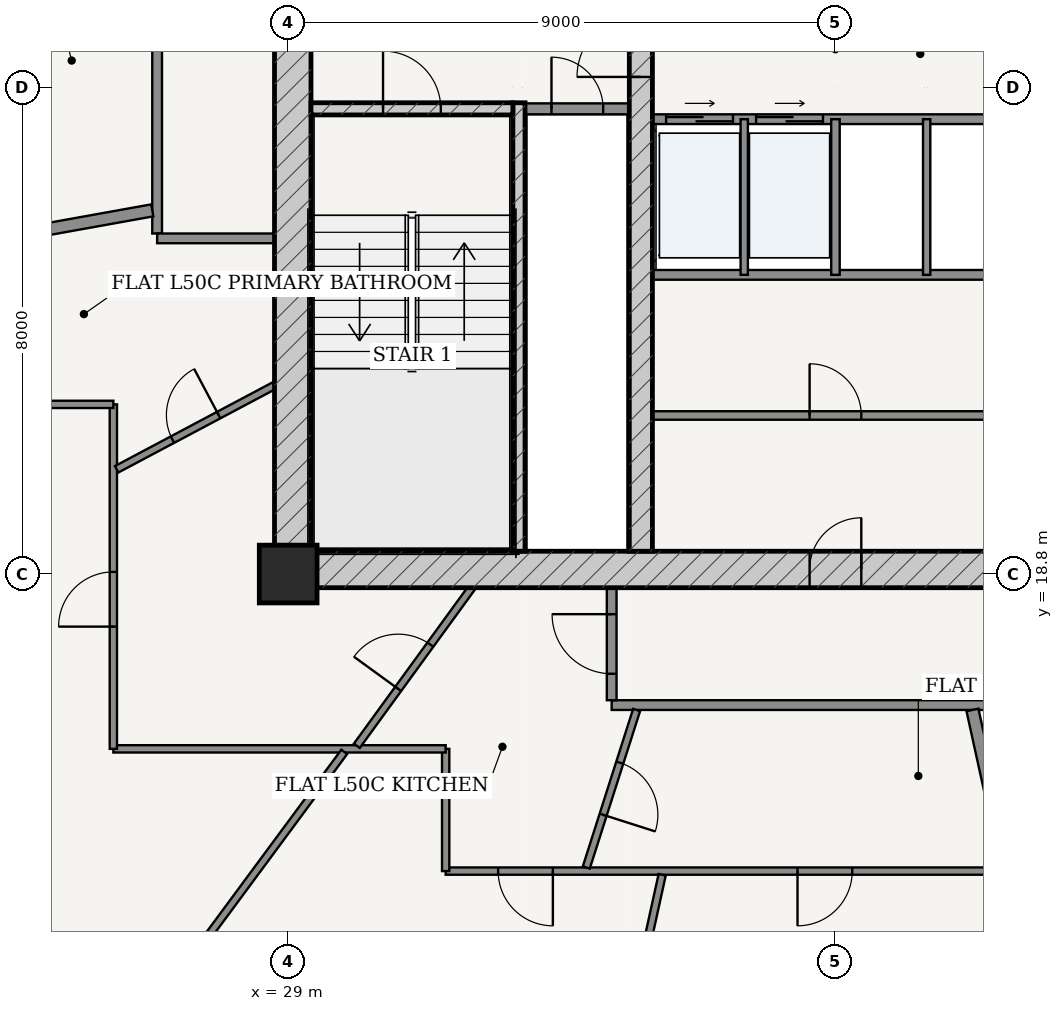
"""IFC4 building model, lengths in metres.
Left out: names, types, materials, properties, quantities, classifications, styles, units other than length and angle.
Written with IfcOpenShell. Run it as: python <this file> out.ifc"""

import sys

from ifc_helpers import new_model, si_unit, direction, frame, frame_2d, origin, origin_2d, place, context, subcontext, project, spatial, rectangle, extrude, source, transform, mapped, element, fill, save


model = new_model("IFC4")
c1 = context("Model", 3, precision=1e-05, world=origin(), true_north=direction((-0.2419218956, 0.970295726276)))
c2 = subcontext(c1, "Body", "Model", "MODEL_VIEW")
j1 = project(units=[si_unit("LENGTHUNIT", "METRE"), si_unit("PLANEANGLEUNIT", "RADIAN")], contexts=[c1])
p1 = place(None, origin())
s1 = spatial("IfcSite", under=j1, at=p1, CompositionType="ELEMENT")
p2 = place(p1, origin())
s2 = spatial("IfcBuilding", under=s1, at=p2, CompositionType="ELEMENT")
p3 = place(p2, frame((0.0, 0.0, 191.2)))
s3 = spatial("IfcBuildingStorey", under=s2, at=p3, CompositionType="ELEMENT", Elevation=191.2)
p4 = place(p3, frame((29.0, 18.8, 0.0), z_axis=(0.0, 0.0, 1.0), x_axis=(1.0, 0.0, 0.0)))
e1 = element("IfcColumn", 1, at=p4, inside=s3, PredefinedType="COLUMN", context=c2, shape_type="SweptSolid", body=[
    extrude(rectangle(XDim=0.95, YDim=0.95, at=origin_2d()), origin(), (0.0, 0.0, 1.0), 3.7),
])
p5 = place(p3, frame((28.775, 18.875, 0.0), z_axis=(0.0, 0.0, 1.0), x_axis=(1.0, 0.0, 0.0)))
e2 = element("IfcWall", 2, at=p5, inside=s3, PredefinedType="SHEAR", context=c2, shape_type="SweptSolid", body=[
    extrude(rectangle(XDim=18.45, YDim=0.6, at=frame_2d((9.225, 0.0))), origin(), (0.0, 0.0, 1.0), 3.435),
])
p6 = place(p5, frame((8.8, 0.0, 0.0)))
e3 = element("IfcOpeningElement", 3, at=p6, cuts=e2, PredefinedType="OPENING", context=c2, shape_type="SweptSolid", body=[
    extrude(rectangle(XDim=0.85, YDim=2.1, at=frame_2d((0.425, 1.05))), frame((0.0, 0.31, 0.0), z_axis=(0.0, -1.0, 0.0), x_axis=(1.0, 0.0, 0.0)), (0.0, 0.0, 1.0), 0.62),
])
p7 = place(p3, frame((29.075, 19.175, 0.0), z_axis=(0.0, 0.0, 1.0), x_axis=(0.0, 1.0, 0.0)))
e4 = element("IfcWall", 4, at=p7, inside=s3, PredefinedType="SHEAR", context=c2, shape_type="SweptSolid", body=[
    extrude(rectangle(XDim=15.25, YDim=0.6, at=frame_2d((7.625, 0.0))), origin(), (0.0, 0.0, 1.0), 3.435),
])
p8 = place(p7, frame((9.875, 0.0, 0.0)))
e5 = element("IfcOpeningElement", 5, at=p8, cuts=e4, PredefinedType="OPENING", context=c2, shape_type="SweptSolid", body=[
    extrude(rectangle(XDim=1.5, YDim=2.2, at=frame_2d((0.75, 1.1))), frame((0.0, 0.31, 0.0), z_axis=(0.0, -1.0, 0.0), x_axis=(1.0, 0.0, 0.0)), (0.0, 0.0, 1.0), 0.62),
])
p9 = place(p3, frame((32.795, 19.175, 0.0), z_axis=(0.0, 0.0, 1.0), x_axis=(0.0, 1.0, 0.0)))
e6 = element("IfcWall", 6, at=p9, inside=s3, PredefinedType="SOLIDWALL", context=c2, shape_type="SweptSolid", body=[
    extrude(rectangle(XDim=7.375, YDim=0.2, at=frame_2d((3.688, 0.0))), origin(), (0.0, 0.0, 1.0), 3.435),
])
p10 = place(p3, frame((29.375, 26.45, 0.0), z_axis=(0.0, 0.0, 1.0), x_axis=(1.0, 0.0, 0.0)))
e7 = element("IfcWall", 7, at=p10, inside=s3, PredefinedType="SOLIDWALL", context=c2, shape_type="SweptSolid", body=[
    extrude(rectangle(XDim=3.32, YDim=0.2, at=frame_2d((1.66, 0.0))), origin(), (0.0, 0.0, 1.0), 3.435),
])
p11 = place(p10, frame((1.185, 0.0, 0.0)))
e8 = element("IfcOpeningElement", 8, at=p11, cuts=e7, PredefinedType="OPENING", context=c2, shape_type="SweptSolid", body=[
    extrude(rectangle(XDim=0.95, YDim=2.15, at=frame_2d((0.475, 1.075))), frame((0.0, 0.11, 0.0), z_axis=(0.0, -1.0, 0.0), x_axis=(1.0, 0.0, 0.0)), (0.0, 0.0, 1.0), 0.22),
])
p12 = place(p3, frame((34.8, 19.175, 0.0), z_axis=(0.0, 0.0, 1.0), x_axis=(0.0, 1.0, 0.0)))
e9 = element("IfcWall", 9, at=p12, inside=s3, PredefinedType="SHEAR", context=c2, shape_type="SweptSolid", body=[
    extrude(rectangle(XDim=15.25, YDim=0.38, at=frame_2d((7.625, 0.0))), origin(), (0.0, 0.0, 1.0), 3.435),
])
p13 = place(p12, frame((7.8, 0.0, 0.0)))
e10 = element("IfcOpeningElement", 10, at=p13, cuts=e9, PredefinedType="OPENING", context=c2, shape_type="SweptSolid", body=[
    extrude(rectangle(XDim=1.05, YDim=2.15, at=frame_2d((0.525, 1.075))), frame((0.0, 0.2, 0.0), z_axis=(0.0, -1.0, 0.0), x_axis=(1.0, 0.0, 0.0)), (0.0, 0.0, 1.0), 0.4),
])
p14 = place(p3, frame((32.9, 26.45, 0.0), z_axis=(0.0, 0.0, 1.0), x_axis=(1.0, 0.0, 0.0)))
e11 = element("IfcWall", 11, at=p14, inside=s3, PredefinedType="PARTITIONING", context=c2, shape_type="SweptSolid", body=[
    extrude(rectangle(XDim=1.71, YDim=0.18, at=frame_2d((0.855, 0.0))), origin(), (0.0, 0.0, 1.0), 3.435),
])
p15 = place(p14, frame((0.43, 0.0, 0.0)))
e12 = element("IfcOpeningElement", 12, at=p15, cuts=e11, PredefinedType="OPENING", context=c2, shape_type="SweptSolid", body=[
    extrude(rectangle(XDim=0.85, YDim=2.1, at=frame_2d((0.425, 1.05))), frame((0.0, 0.1, 0.0), z_axis=(0.0, -1.0, 0.0), x_axis=(1.0, 0.0, 0.0)), (0.0, 0.0, 1.0), 0.2),
])
p16 = place(p3, frame((34.99, 26.28, 0.0), z_axis=(0.0, 0.0, 1.0), x_axis=(1.0, 0.0, 0.0)))
e13 = element("IfcWall", 13, at=p16, inside=s3, PredefinedType="PARTITIONING", context=c2, shape_type="SweptSolid", body=[
    extrude(rectangle(XDim=6.02, YDim=0.16, at=frame_2d((3.01, 0.0))), origin(), (0.0, 0.0, 1.0), 3.435),
])
p17 = place(p16, frame((0.225, 0.0, 0.0)))
e14 = element("IfcOpeningElement", 14, at=p17, cuts=e13, PredefinedType="OPENING", context=c2, shape_type="SweptSolid", body=[
    extrude(rectangle(XDim=1.1, YDim=2.2, at=frame_2d((0.55, 1.1))), frame((0.0, 0.09, 0.0), z_axis=(0.0, -1.0, 0.0), x_axis=(1.0, 0.0, 0.0)), (0.0, 0.0, 1.0), 0.18),
])
p18 = place(p16, frame((1.705, 0.0, 0.0)))
e15 = element("IfcOpeningElement", 15, at=p18, cuts=e13, PredefinedType="OPENING", context=c2, shape_type="SweptSolid", body=[
    extrude(rectangle(XDim=1.1, YDim=2.2, at=frame_2d((0.55, 1.1))), frame((0.0, 0.09, 0.0), z_axis=(0.0, -1.0, 0.0), x_axis=(1.0, 0.0, 0.0)), (0.0, 0.0, 1.0), 0.18),
])
p19 = place(p3, frame((34.99, 23.72, 0.0), z_axis=(0.0, 0.0, 1.0), x_axis=(1.0, 0.0, 0.0)))
e16 = element("IfcWall", 16, at=p19, inside=s3, PredefinedType="PARTITIONING", context=c2, shape_type="SweptSolid", body=[
    extrude(rectangle(XDim=6.02, YDim=0.16, at=frame_2d((3.01, 0.0))), origin(), (0.0, 0.0, 1.0), 3.435),
])
p20 = place(p3, frame((36.5, 23.72, 0.0), z_axis=(0.0, 0.0, 1.0), x_axis=(0.0, 1.0, 0.0)))
e17 = element("IfcWall", 17, at=p20, inside=s3, PredefinedType="PARTITIONING", context=c2, shape_type="SweptSolid", body=[
    extrude(rectangle(XDim=2.56, YDim=0.12, at=frame_2d((1.28, 0.0))), origin(), (0.0, 0.0, 1.0), 3.435),
])
p21 = place(p3, frame((38.0, 23.72, 0.0), z_axis=(0.0, 0.0, 1.0), x_axis=(0.0, 1.0, 0.0)))
e18 = element("IfcWall", 18, at=p21, inside=s3, PredefinedType="PARTITIONING", context=c2, shape_type="SweptSolid", body=[
    extrude(rectangle(XDim=2.56, YDim=0.14, at=frame_2d((1.28, 0.0))), origin(), (0.0, 0.0, 1.0), 3.435),
])
p22 = place(p3, frame((39.5, 23.72, 0.0), z_axis=(0.0, 0.0, 1.0), x_axis=(0.0, 1.0, 0.0)))
e19 = element("IfcWall", 19, at=p22, inside=s3, PredefinedType="PARTITIONING", context=c2, shape_type="SweptSolid", body=[
    extrude(rectangle(XDim=2.56, YDim=0.12, at=frame_2d((1.28, 0.0))), origin(), (0.0, 0.0, 1.0), 3.435),
])
p23 = place(p3, frame((34.99, 21.407, 0.0), z_axis=(0.0, 0.0, 1.0), x_axis=(1.0, 0.0, 0.0)))
e20 = element("IfcWall", 20, at=p23, inside=s3, PredefinedType="PARTITIONING", context=c2, shape_type="SweptSolid", body=[
    extrude(rectangle(XDim=6.02, YDim=0.14, at=frame_2d((3.01, 0.0))), origin(), (0.0, 0.0, 1.0), 3.435),
])
p24 = place(p23, frame((2.585, 0.0, 0.0)))
e21 = element("IfcOpeningElement", 21, at=p24, cuts=e20, PredefinedType="OPENING", context=c2, shape_type="SweptSolid", body=[
    extrude(rectangle(XDim=0.85, YDim=2.1, at=frame_2d((0.425, 1.05))), frame((0.0, 0.08, 0.0), z_axis=(0.0, -1.0, 0.0), x_axis=(1.0, 0.0, 0.0)), (0.0, 0.0, 1.0), 0.16),
])
p25 = place(p3, frame((26.845, 24.4, 0.0), z_axis=(0.0, 0.0, 1.0), x_axis=(0.0, 1.0, 0.0)))
e22 = element("IfcWall", 22, at=p25, inside=s3, PredefinedType="PARTITIONING", context=c2, shape_type="SweptSolid", body=[
    extrude(rectangle(XDim=10.625, YDim=0.16, at=frame_2d((5.312, 0.0))), origin(), (0.0, 0.0, 1.0), 2.951),
])
p26 = place(p3, frame((26.845, 24.32, 0.0), z_axis=(0.0, 0.0, 1.0), x_axis=(1.0, 0.0, 0.0)))
e23 = element("IfcWall", 23, at=p26, inside=s3, PredefinedType="PARTITIONING", context=c2, shape_type="SweptSolid", body=[
    extrude(rectangle(XDim=1.93, YDim=0.16, at=frame_2d((0.965, 0.0))), origin(), (0.0, 0.0, 1.0), 3.435),
])
p27 = place(p3, frame((34.32, 16.645, 0.0), z_axis=(0.0, 0.0, 1.0), x_axis=(1.0, 0.0, 0.0)))
e24 = element("IfcWall", 24, at=p27, inside=s3, PredefinedType="PARTITIONING", context=c2, shape_type="SweptSolid", body=[
    extrude(rectangle(XDim=14.835, YDim=0.16, at=frame_2d((7.417, 0.0))), origin(), (0.0, 0.0, 1.0), 2.951),
])
p28 = place(p27, frame((11.961, 0.0, 0.0)))
e25 = element("IfcOpeningElement", 25, at=p28, cuts=e24, PredefinedType="OPENING", context=c2, shape_type="SweptSolid", body=[
    extrude(rectangle(XDim=0.98, YDim=2.2, at=frame_2d((0.49, 1.1))), frame((0.0, 0.09, 0.0), z_axis=(0.0, -1.0, 0.0), x_axis=(1.0, 0.0, 0.0)), (0.0, 0.0, 1.0), 0.18),
])
p29 = place(p3, frame((34.32, 16.725, 0.0), z_axis=(0.0, 0.0, 1.0), x_axis=(0.0, 1.0, 0.0)))
e26 = element("IfcWall", 26, at=p29, inside=s3, PredefinedType="PARTITIONING", context=c2, shape_type="SweptSolid", body=[
    extrude(rectangle(XDim=1.85, YDim=0.16, at=frame_2d((0.925, 0.0))), origin(), (0.0, 0.0, 1.0), 3.435),
])
p30 = place(p29, frame((0.435, 0.0, 0.0)))
e27 = element("IfcOpeningElement", 27, at=p30, cuts=e26, PredefinedType="OPENING", context=c2, shape_type="SweptSolid", body=[
    extrude(rectangle(XDim=0.98, YDim=2.2, at=frame_2d((0.49, 1.1))), frame((0.0, 0.09, 0.0), z_axis=(0.0, -1.0, 0.0), x_axis=(1.0, 0.0, 0.0)), (0.0, 0.0, 1.0), 0.18),
])
p31 = place(p3, frame((26.765, 24.781, 0.0), z_axis=(0.0, 0.0, 1.0), x_axis=(-0.984226684914, -0.176911934879, 0.0)))
e28 = element("IfcWall", 28, at=p31, inside=s3, PredefinedType="PARTITIONING", context=c2, shape_type="SweptSolid", body=[
    extrude(rectangle(XDim=10.202, YDim=0.2, at=frame_2d((5.101, 0.0))), origin(), (0.0, 0.0, 1.0), 2.951),
])
p32 = place(p3, frame((40.734, 13.915, 0.0), z_axis=(0.0, 0.0, 1.0), x_axis=(-1.0, 0.0, 0.0)))
e29 = element("IfcWall", 29, at=p32, inside=s3, PredefinedType="PARTITIONING", context=c2, shape_type="SweptSolid", body=[
    extrude(rectangle(XDim=9.144, YDim=0.12, at=frame_2d((4.572, 0.0))), origin(), (0.0, 0.0, 1.0), 2.951),
])
p33 = place(p32, frame((7.381, 0.0, 0.0)))
e30 = element("IfcOpeningElement", 30, at=p33, cuts=e29, PredefinedType="OPENING", context=c2, shape_type="SweptSolid", body=[
    extrude(rectangle(XDim=0.9, YDim=2.15, at=frame_2d((0.45, 1.075))), frame((0.0, 0.07, 0.0), z_axis=(0.0, -1.0, 0.0), x_axis=(1.0, 0.0, 0.0)), (0.0, 0.0, 1.0), 0.14),
])
p34 = place(p32, frame((2.458, 0.0, 0.0)))
e31 = element("IfcOpeningElement", 31, at=p34, cuts=e29, PredefinedType="OPENING", context=c2, shape_type="SweptSolid", body=[
    extrude(rectangle(XDim=0.9, YDim=2.15, at=frame_2d((0.45, 1.075))), frame((0.0, 0.07, 0.0), z_axis=(0.0, -1.0, 0.0), x_axis=(1.0, 0.0, 0.0)), (0.0, 0.0, 1.0), 0.14),
])
p35 = place(p3, frame((31.59, 13.915, 0.0), z_axis=(0.0, 0.0, 1.0), x_axis=(0.0, 1.0, 0.0)))
e32 = element("IfcWall", 32, at=p35, inside=s3, PredefinedType="PARTITIONING", context=c2, shape_type="SweptSolid", body=[
    extrude(rectangle(XDim=2.01, YDim=0.12, at=frame_2d((1.005, 0.0))), origin(), (0.0, 0.0, 1.0), 3.11),
])
p36 = place(p3, frame((31.59, 15.925, 0.0), z_axis=(0.0, 0.0, 1.0), x_axis=(-1.0, 0.0, 0.0)))
e33 = element("IfcWall", 33, at=p36, inside=s3, PredefinedType="PARTITIONING", context=c2, shape_type="SweptSolid", body=[
    extrude(rectangle(XDim=5.465, YDim=0.12, at=frame_2d((2.732, 0.0))), origin(), (0.0, 0.0, 1.0), 2.951),
])
p37 = place(p3, frame((26.125, 15.925, 0.0), z_axis=(0.0, 0.0, 1.0), x_axis=(0.0, 1.0, 0.0)))
e34 = element("IfcWall", 34, at=p37, inside=s3, PredefinedType="PARTITIONING", context=c2, shape_type="SweptSolid", body=[
    extrude(rectangle(XDim=5.665, YDim=0.12, at=frame_2d((2.833, 0.0))), origin(), (0.0, 0.0, 1.0), 2.951),
])
p38 = place(p37, frame((2.01, 0.0, 0.0)))
e35 = element("IfcOpeningElement", 35, at=p38, cuts=e34, PredefinedType="OPENING", context=c2, shape_type="SweptSolid", body=[
    extrude(rectangle(XDim=0.9, YDim=2.15, at=frame_2d((0.45, 1.075))), frame((0.0, 0.07, 0.0), z_axis=(0.0, -1.0, 0.0), x_axis=(1.0, 0.0, 0.0)), (0.0, 0.0, 1.0), 0.14),
])
p39 = place(p3, frame((26.125, 21.59, 0.0), z_axis=(0.0, 0.0, 1.0), x_axis=(-1.0, 0.0, 0.0)))
e36 = element("IfcWall", 36, at=p39, inside=s3, PredefinedType="PARTITIONING", context=c2, shape_type="SweptSolid", body=[
    extrude(rectangle(XDim=2.01, YDim=0.12, at=frame_2d((1.005, 0.0))), origin(), (0.0, 0.0, 1.0), 3.11),
])
p40 = place(p3, frame((29.922, 15.875, 0.0), z_axis=(0.0, 0.0, 1.0), x_axis=(-0.594524636617, -0.804077394568, 0.0)))
e37 = element("IfcWall", 37, at=p40, inside=s3, PredefinedType="PARTITIONING", context=c2, shape_type="SweptSolid", body=[
    extrude(rectangle(XDim=6.68, YDim=0.12, at=frame_2d((3.34, 0.0))), origin(), (0.0, 0.0, 1.0), 2.951),
])
p41 = place(p3, frame((35.15, 13.854, 0.0), z_axis=(0.0, 0.0, 1.0), x_axis=(-0.214942949264, -0.976626606519, 0.0)))
e38 = element("IfcWall", 38, at=p41, inside=s3, PredefinedType="PARTITIONING", context=c2, shape_type="SweptSolid", body=[
    extrude(rectangle(XDim=6.427, YDim=0.12, at=frame_2d((3.213, 0.0))), origin(), (0.0, 0.0, 1.0), 2.951),
])
p42 = place(p3, frame((28.775, 21.901, 0.0), z_axis=(0.0, 0.0, 1.0), x_axis=(-0.883156592468, -0.46907828044, 0.0)))
e39 = element("IfcWall", 39, at=p42, inside=s3, PredefinedType="PARTITIONING", context=c2, shape_type="SweptSolid", body=[
    extrude(rectangle(XDim=2.938, YDim=0.12, at=frame_2d((1.469, 0.0))), origin(), (0.0, 0.0, 1.0), 3.435),
])
p43 = place(p42, frame((1.039, 0.0, 0.0)))
e40 = element("IfcOpeningElement", 40, at=p43, cuts=e39, PredefinedType="OPENING", context=c2, shape_type="SweptSolid", body=[
    extrude(rectangle(XDim=0.86, YDim=2.15, at=frame_2d((0.43, 1.075))), frame((0.0, 0.07, 0.0), z_axis=(0.0, -1.0, 0.0), x_axis=(1.0, 0.0, 0.0)), (0.0, 0.0, 1.0), 0.14),
])
p44 = place(p3, frame((32.019, 18.575, 0.0), z_axis=(0.0, 0.0, 1.0), x_axis=(-0.588135570825, -0.808762357143, 0.0)))
e41 = element("IfcWall", 41, at=p44, inside=s3, PredefinedType="PARTITIONING", context=c2, shape_type="SweptSolid", body=[
    extrude(rectangle(XDim=3.215, YDim=0.12, at=frame_2d((1.607, 0.0))), origin(), (0.0, 0.0, 1.0), 3.435),
])
p45 = place(p44, frame((1.157, 0.0, 0.0)))
e42 = element("IfcOpeningElement", 42, at=p45, cuts=e41, PredefinedType="OPENING", context=c2, shape_type="SweptSolid", body=[
    extrude(rectangle(XDim=0.9, YDim=2.15, at=frame_2d((0.45, 1.075))), frame((0.0, 0.07, 0.0), z_axis=(0.0, -1.0, 0.0), x_axis=(1.0, 0.0, 0.0)), (0.0, 0.0, 1.0), 0.14),
])
p46 = place(p3, frame((34.73, 16.565, 0.0), z_axis=(0.0, 0.0, 1.0), x_axis=(-0.304300161081, -0.952576197459, 0.0)))
e43 = element("IfcWall", 43, at=p46, inside=s3, PredefinedType="PARTITIONING", context=c2, shape_type="SweptSolid", body=[
    extrude(rectangle(XDim=2.72, YDim=0.12, at=frame_2d((1.36, 0.0))), origin(), (0.0, 0.0, 1.0), 3.11),
])
p47 = place(p46, frame((0.91, 0.0, 0.0)))
e44 = element("IfcOpeningElement", 44, at=p47, cuts=e43, PredefinedType="OPENING", context=c2, shape_type="SweptSolid", body=[
    extrude(rectangle(XDim=0.9, YDim=2.15, at=frame_2d((0.45, 1.075))), frame((0.0, 0.07, 0.0), z_axis=(0.0, -1.0, 0.0), x_axis=(1.0, 0.0, 0.0)), (0.0, 0.0, 1.0), 0.14),
])
p48 = place(p3, frame((40.253, 16.565, 0.0), z_axis=(0.0, 0.0, 1.0), x_axis=(0.214957946814, -0.976623305631, 0.0)))
e45 = element("IfcWall", 45, at=p48, inside=s3, PredefinedType="PARTITIONING", context=c2, shape_type="SweptSolid", body=[
    extrude(rectangle(XDim=9.202, YDim=0.2, at=frame_2d((4.601, 0.0))), origin(), (0.0, 0.0, 1.0), 2.951),
])
m1 = source(origin(), c2, "Body", "SweptSolid", [
    extrude(rectangle(XDim=1.05, YDim=2.15, at=frame_2d((0.525, 1.075))), frame((0.0, 0.025, 0.0), z_axis=(0.0, -1.0, 0.0), x_axis=(1.0, 0.0, 0.0)), (0.0, 0.0, 1.0), 0.05),
])
p49 = place(p13, origin())
e46 = element("IfcDoor", 46, at=p49, inside=s3, OperationType="SINGLE_SWING_LEFT", PredefinedType="DOOR", context=c2, shape_type="MappedRepresentation", body=[
    mapped(m1, transform((0.0, 0.0, 0.0), scale=1.0)),
])
fill(e10, e46)
m2 = source(origin(), c2, "Body", "SweptSolid", [
    extrude(rectangle(XDim=0.95, YDim=2.15, at=frame_2d((0.475, 1.075))), frame((0.0, 0.025, 0.0), z_axis=(0.0, -1.0, 0.0), x_axis=(1.0, 0.0, 0.0)), (0.0, 0.0, 1.0), 0.05),
])
p50 = place(p11, origin())
e47 = element("IfcDoor", 47, at=p50, inside=s3, OperationType="SINGLE_SWING_LEFT", PredefinedType="DOOR", context=c2, shape_type="MappedRepresentation", body=[
    mapped(m2, transform((0.0, 0.0, 0.0), scale=1.0)),
])
fill(e8, e47)
m3 = source(origin(), c2, "Body", "SweptSolid", [
    extrude(rectangle(XDim=0.85, YDim=2.1, at=frame_2d((0.425, 1.05))), frame((0.0, 0.025, 0.0), z_axis=(0.0, -1.0, 0.0), x_axis=(1.0, 0.0, 0.0)), (0.0, 0.0, 1.0), 0.05),
])
p51 = place(p15, origin())
e48 = element("IfcDoor", 48, at=p51, inside=s3, OperationType="SINGLE_SWING_LEFT", PredefinedType="DOOR", context=c2, shape_type="MappedRepresentation", body=[
    mapped(m3, transform((0.0, 0.0, 0.0), scale=1.0)),
])
fill(e12, e48)
p52 = place(p6, origin())
e49 = element("IfcDoor", 49, at=p52, inside=s3, OperationType="SINGLE_SWING_RIGHT", PredefinedType="DOOR", context=c2, shape_type="MappedRepresentation", body=[
    mapped(m3, transform((0.0, 0.0, 0.0), scale=1.0)),
])
fill(e3, e49)
p53 = place(p24, origin())
e50 = element("IfcDoor", 50, at=p53, inside=s3, OperationType="SINGLE_SWING_LEFT", PredefinedType="DOOR", context=c2, shape_type="MappedRepresentation", body=[
    mapped(m3, transform((0.0, 0.0, 0.0), scale=1.0)),
])
fill(e21, e50)
m4 = source(origin(), c2, "Body", "SweptSolid", [
    extrude(rectangle(XDim=1.1, YDim=2.2, at=frame_2d((0.55, 1.1))), frame((0.0, 0.025, 0.0), z_axis=(0.0, -1.0, 0.0), x_axis=(1.0, 0.0, 0.0)), (0.0, 0.0, 1.0), 0.05),
])
p54 = place(p17, origin())
e51 = element("IfcDoor", 51, at=p54, inside=s3, OperationType="DOUBLE_DOOR_SLIDING", PredefinedType="DOOR", context=c2, shape_type="MappedRepresentation", body=[
    mapped(m4, transform((0.0, 0.0, 0.0), scale=1.0)),
])
fill(e14, e51)
p55 = place(p18, origin())
e52 = element("IfcDoor", 52, at=p55, inside=s3, OperationType="DOUBLE_DOOR_SLIDING", PredefinedType="DOOR", context=c2, shape_type="MappedRepresentation", body=[
    mapped(m4, transform((0.0, 0.0, 0.0), scale=1.0)),
])
fill(e15, e52)
m5 = source(origin(), c2, "Body", "SweptSolid", [
    extrude(rectangle(XDim=0.98, YDim=2.2, at=frame_2d((0.49, 1.1))), frame((0.0, 0.025, 0.0), z_axis=(0.0, -1.0, 0.0), x_axis=(1.0, 0.0, 0.0)), (0.0, 0.0, 1.0), 0.05),
])
p56 = place(p30, origin())
e53 = element("IfcDoor", 53, at=p56, inside=s3, OperationType="SINGLE_SWING_RIGHT", PredefinedType="DOOR", context=c2, shape_type="MappedRepresentation", body=[
    mapped(m5, transform((0.0, 0.0, 0.0), scale=1.0)),
])
fill(e27, e53)
m6 = source(origin(), c2, "Body", "SweptSolid", [
    extrude(rectangle(XDim=0.9, YDim=2.15, at=frame_2d((0.45, 1.075))), frame((0.0, 0.025, 0.0), z_axis=(0.0, -1.0, 0.0), x_axis=(1.0, 0.0, 0.0)), (0.0, 0.0, 1.0), 0.05),
])
p57 = place(p45, frame((0.9, 0.0, 0.0), z_axis=(0.0, 0.0, 1.0), x_axis=(-1.0, 0.0, 0.0)))
e54 = element("IfcDoor", 54, at=p57, inside=s3, OperationType="SINGLE_SWING_LEFT", PredefinedType="DOOR", context=c2, shape_type="MappedRepresentation", body=[
    mapped(m6, transform((0.0, 0.0, 0.0), scale=1.0)),
])
fill(e42, e54)
p58 = place(p47, origin())
e55 = element("IfcDoor", 55, at=p58, inside=s3, OperationType="SINGLE_SWING_RIGHT", PredefinedType="DOOR", context=c2, shape_type="MappedRepresentation", body=[
    mapped(m6, transform((0.0, 0.0, 0.0), scale=1.0)),
])
fill(e44, e55)
p59 = place(p33, origin())
e56 = element("IfcDoor", 56, at=p59, inside=s3, OperationType="SINGLE_SWING_LEFT", PredefinedType="DOOR", context=c2, shape_type="MappedRepresentation", body=[
    mapped(m6, transform((0.0, 0.0, 0.0), scale=1.0)),
])
fill(e30, e56)
m7 = source(origin(), c2, "Body", "SweptSolid", [
    extrude(rectangle(XDim=0.86, YDim=2.15, at=frame_2d((0.43, 1.075))), frame((0.0, 0.025, 0.0), z_axis=(0.0, -1.0, 0.0), x_axis=(1.0, 0.0, 0.0)), (0.0, 0.0, 1.0), 0.05),
])
p60 = place(p43, frame((0.86, 0.0, 0.0), z_axis=(0.0, 0.0, 1.0), x_axis=(-1.0, 0.0, 0.0)))
e57 = element("IfcDoor", 57, at=p60, inside=s3, OperationType="SINGLE_SWING_RIGHT", PredefinedType="DOOR", context=c2, shape_type="MappedRepresentation", body=[
    mapped(m7, transform((0.0, 0.0, 0.0), scale=1.0)),
])
fill(e40, e57)
p61 = place(p38, origin())
e58 = element("IfcDoor", 58, at=p61, inside=s3, OperationType="SINGLE_SWING_LEFT", PredefinedType="DOOR", context=c2, shape_type="MappedRepresentation", body=[
    mapped(m6, transform((0.0, 0.0, 0.0), scale=1.0)),
])
fill(e35, e58)
p62 = place(p34, origin())
e59 = element("IfcDoor", 59, at=p62, inside=s3, OperationType="SINGLE_SWING_RIGHT", PredefinedType="DOOR", context=c2, shape_type="MappedRepresentation", body=[
    mapped(m6, transform((0.0, 0.0, 0.0), scale=1.0)),
])
fill(e31, e59)
save(model, sys.argv[1])
